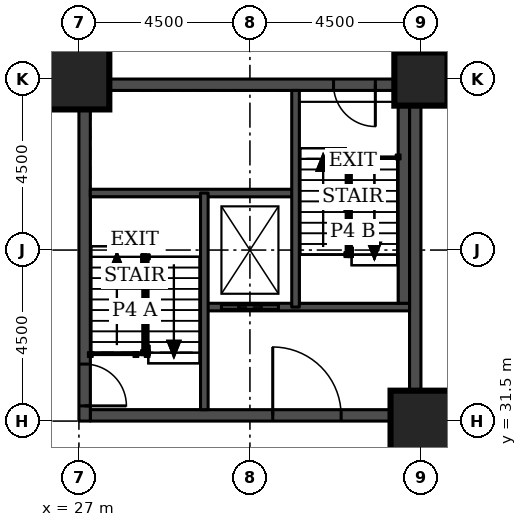
"""IFC4 building model, lengths in metres.
Left out: names, types, materials, properties, quantities, classifications, styles, units other than length and angle.
Written with IfcOpenShell. Run it as: python <this file> out.ifc"""

import sys

from ifc_helpers import new_model, si_unit, direction, frame, frame_2d, origin, origin_2d, place, context, subcontext, project, spatial, rectangle, extrude, element, fill, save


model = new_model("IFC4")
c1 = context("Model", 3, precision=1e-05, world=origin(), true_north=direction((0.0, 1.0)))
c2 = subcontext(c1, "Body", "Model", "MODEL_VIEW")
j1 = project(units=[si_unit("LENGTHUNIT", "METRE"), si_unit("PLANEANGLEUNIT", "RADIAN")], contexts=[c1])
p1 = place(None, origin())
s1 = spatial("IfcSite", under=j1, at=p1, CompositionType="ELEMENT")
p2 = place(p1, origin())
s2 = spatial("IfcBuilding", under=s1, at=p2, CompositionType="ELEMENT")
p3 = place(p2, frame((0.0, 0.0, 8.0)))
s3 = spatial("IfcBuildingStorey", under=s2, at=p3, CompositionType="ELEMENT", Elevation=8.0)
for number, where, z_axis, x_axis in (
    (1, (36.0, 31.5, 0.0), (0.0, 0.0, 1.0), (1.0, 0.0, 0.0)),
    (2, (27.0, 40.5, 0.0), (0.0, 0.0, 1.0), (1.0, 0.0, 0.0)),
):
    element("IfcColumn", number, at=place(p3, frame(where, z_axis=z_axis, x_axis=x_axis)), inside=s3, PredefinedType="COLUMN", context=c2, shape_type="SweptSolid", body=[
        extrude(rectangle(XDim=1.6, YDim=1.6, at=origin_2d()), origin(), (0.0, 0.0, 1.0), 5.5),
    ])
p4 = place(p3, frame((36.0, 40.5, 0.0), z_axis=(0.0, 0.0, 1.0), x_axis=(1.0, 0.0, 0.0)))
e3 = element("IfcColumn", 3, at=p4, inside=s3, PredefinedType="COLUMN", context=c2, shape_type="SweptSolid", body=[
    extrude(rectangle(XDim=1.4, YDim=1.4, at=origin_2d()), origin(), (0.0, 0.0, 1.0), 5.5),
])
p5 = place(p3, frame((27.3, 31.65, 0.0), z_axis=(0.0, 0.0, 1.0), x_axis=(1.0, 0.0, 0.0)))
e4 = element("IfcWall", 4, at=p5, inside=s3, PredefinedType="SHEAR", context=c2, shape_type="SweptSolid", body=[
    extrude(rectangle(XDim=8.4, YDim=0.3, at=frame_2d((4.2, 0.0))), origin(), (0.0, 0.0, 1.0), 5.5),
])
p6 = place(p5, frame((4.8, 0.0, 0.0)))
e5 = element("IfcOpeningElement", 5, at=p6, cuts=e4, PredefinedType="OPENING", context=c2, shape_type="SweptSolid", body=[
    extrude(rectangle(XDim=1.8, YDim=2.1, at=frame_2d((0.9, 1.05))), frame((0.0, 0.16, 0.0), z_axis=(0.0, -1.0, 0.0), x_axis=(1.0, 0.0, 0.0)), (0.0, 0.0, 1.0), 0.32),
])
p7 = place(p3, frame((27.3, 40.35, 0.0), z_axis=(0.0, 0.0, 1.0), x_axis=(1.0, 0.0, 0.0)))
e6 = element("IfcWall", 6, at=p7, inside=s3, PredefinedType="SHEAR", context=c2, shape_type="SweptSolid", body=[
    extrude(rectangle(XDim=8.4, YDim=0.3, at=frame_2d((4.2, 0.0))), origin(), (0.0, 0.0, 1.0), 5.5),
])
p8 = place(p7, frame((6.4, 0.0, 0.0)))
e7 = element("IfcOpeningElement", 7, at=p8, cuts=e6, PredefinedType="OPENING", context=c2, shape_type="SweptSolid", body=[
    extrude(rectangle(XDim=1.1, YDim=2.1, at=frame_2d((0.55, 1.05))), frame((0.0, 0.16, 0.0), z_axis=(0.0, -1.0, 0.0), x_axis=(1.0, 0.0, 0.0)), (0.0, 0.0, 1.0), 0.32),
])
p9 = place(p3, frame((27.15, 31.5, 0.0), z_axis=(0.0, 0.0, 1.0), x_axis=(0.0, 1.0, 0.0)))
e8 = element("IfcWall", 8, at=p9, inside=s3, PredefinedType="SHEAR", context=c2, shape_type="SweptSolid", body=[
    extrude(rectangle(XDim=9.0, YDim=0.3, at=frame_2d((4.5, 0.0))), origin(), (0.0, 0.0, 1.0), 5.5),
])
p10 = place(p9, frame((0.4, 0.0, 0.0)))
e9 = element("IfcOpeningElement", 9, at=p10, cuts=e8, PredefinedType="OPENING", context=c2, shape_type="SweptSolid", body=[
    extrude(rectangle(XDim=1.1, YDim=2.1, at=frame_2d((0.55, 1.05))), frame((0.0, 0.16, 0.0), z_axis=(0.0, -1.0, 0.0), x_axis=(1.0, 0.0, 0.0)), (0.0, 0.0, 1.0), 0.32),
])
p11 = place(p3, frame((35.85, 31.5, 0.0), z_axis=(0.0, 0.0, 1.0), x_axis=(0.0, 1.0, 0.0)))
e10 = element("IfcWall", 10, at=p11, inside=s3, PredefinedType="SHEAR", context=c2, shape_type="SweptSolid", body=[
    extrude(rectangle(XDim=9.0, YDim=0.3, at=frame_2d((4.5, 0.0))), origin(), (0.0, 0.0, 1.0), 5.5),
])
p12 = place(p3, frame((30.3, 34.5, 0.0), z_axis=(0.0, 0.0, 1.0), x_axis=(1.0, 0.0, 0.0)))
e11 = element("IfcWall", 11, at=p12, inside=s3, PredefinedType="SOLIDWALL", context=c2, shape_type="SweptSolid", body=[
    extrude(rectangle(XDim=5.4, YDim=0.2, at=frame_2d((2.7, 0.0))), origin(), (0.0, 0.0, 1.0), 5.15),
])
p13 = place(p12, frame((0.45, 0.0, 0.0)))
e12 = element("IfcOpeningElement", 12, at=p13, cuts=e11, PredefinedType="OPENING", context=c2, shape_type="SweptSolid", body=[
    extrude(rectangle(XDim=1.5, YDim=2.1, at=frame_2d((0.75, 1.05))), frame((0.0, 0.11, 0.0), z_axis=(0.0, -1.0, 0.0), x_axis=(1.0, 0.0, 0.0)), (0.0, 0.0, 1.0), 0.22),
])
p14 = place(p3, frame((27.3, 37.5, 0.0), z_axis=(0.0, 0.0, 1.0), x_axis=(1.0, 0.0, 0.0)))
e13 = element("IfcWall", 13, at=p14, inside=s3, PredefinedType="SOLIDWALL", context=c2, shape_type="SweptSolid", body=[
    extrude(rectangle(XDim=5.4, YDim=0.2, at=frame_2d((2.7, 0.0))), origin(), (0.0, 0.0, 1.0), 5.15),
])
for number, where, z_axis, x_axis in (
    (14, (30.3, 31.8, 0.0), (0.0, 0.0, 1.0), (0.0, 1.0, 0.0)),
    (15, (32.7, 34.5, 0.0), (0.0, 0.0, 1.0), (0.0, 1.0, 0.0)),
):
    element("IfcWall", number, at=place(p3, frame(where, z_axis=z_axis, x_axis=x_axis)), inside=s3, PredefinedType="SOLIDWALL", context=c2, shape_type="SweptSolid", body=[
        extrude(rectangle(XDim=5.7, YDim=0.2, at=frame_2d((2.85, 0.0))), origin(), (0.0, 0.0, 1.0), 5.15),
    ])
p15 = place(p3, frame((35.55, 34.6, 0.0), z_axis=(0.0, 0.0, 1.0), x_axis=(0.0, 1.0, 0.0)))
e16 = element("IfcWall", 16, at=p15, inside=s3, PredefinedType="SOLIDWALL", context=c2, shape_type="SweptSolid", body=[
    extrude(rectangle(XDim=5.6, YDim=0.3, at=frame_2d((2.8, 0.0))), origin(), (0.0, 0.0, 1.0), 5.15),
])
p16 = place(p10, frame((1.1, 0.0, 0.0), z_axis=(0.0, 0.0, 1.0), x_axis=(-1.0, 0.0, 0.0)))
e17 = element("IfcDoor", 17, at=p16, inside=s3, OperationType="SINGLE_SWING_RIGHT", PredefinedType="DOOR", context=c2, shape_type="SweptSolid", body=[
    extrude(rectangle(XDim=1.1, YDim=2.1, at=frame_2d((0.55, 1.05))), frame((0.0, 0.025, 0.0), z_axis=(0.0, -1.0, 0.0), x_axis=(1.0, 0.0, 0.0)), (0.0, 0.0, 1.0), 0.05),
])
fill(e9, e17)
p17 = place(p8, frame((1.1, 0.0, 0.0), z_axis=(0.0, 0.0, 1.0), x_axis=(-1.0, 0.0, 0.0)))
e18 = element("IfcDoor", 18, at=p17, inside=s3, OperationType="SINGLE_SWING_LEFT", PredefinedType="DOOR", context=c2, shape_type="SweptSolid", body=[
    extrude(rectangle(XDim=1.1, YDim=2.1, at=frame_2d((0.55, 1.05))), frame((0.0, 0.025, 0.0), z_axis=(0.0, -1.0, 0.0), x_axis=(1.0, 0.0, 0.0)), (0.0, 0.0, 1.0), 0.05),
])
fill(e7, e18)
p18 = place(p13, origin())
e19 = element("IfcDoor", 19, at=p18, inside=s3, OperationType="DOUBLE_DOOR_SLIDING", PredefinedType="DOOR", context=c2, shape_type="SweptSolid", body=[
    extrude(rectangle(XDim=1.5, YDim=2.1, at=frame_2d((0.75, 1.05))), frame((0.0, 0.025, 0.0), z_axis=(0.0, -1.0, 0.0), x_axis=(1.0, 0.0, 0.0)), (0.0, 0.0, 1.0), 0.05),
])
fill(e12, e19)
p19 = place(p6, origin())
e20 = element("IfcDoor", 20, at=p19, inside=s3, OperationType="SINGLE_SWING_LEFT", PredefinedType="DOOR", context=c2, shape_type="SweptSolid", body=[
    extrude(rectangle(XDim=1.8, YDim=2.1, at=frame_2d((0.9, 1.05))), frame((0.0, 0.025, 0.0), z_axis=(0.0, -1.0, 0.0), x_axis=(1.0, 0.0, 0.0)), (0.0, 0.0, 1.0), 0.05),
])
fill(e5, e20)
save(model, sys.argv[1])
